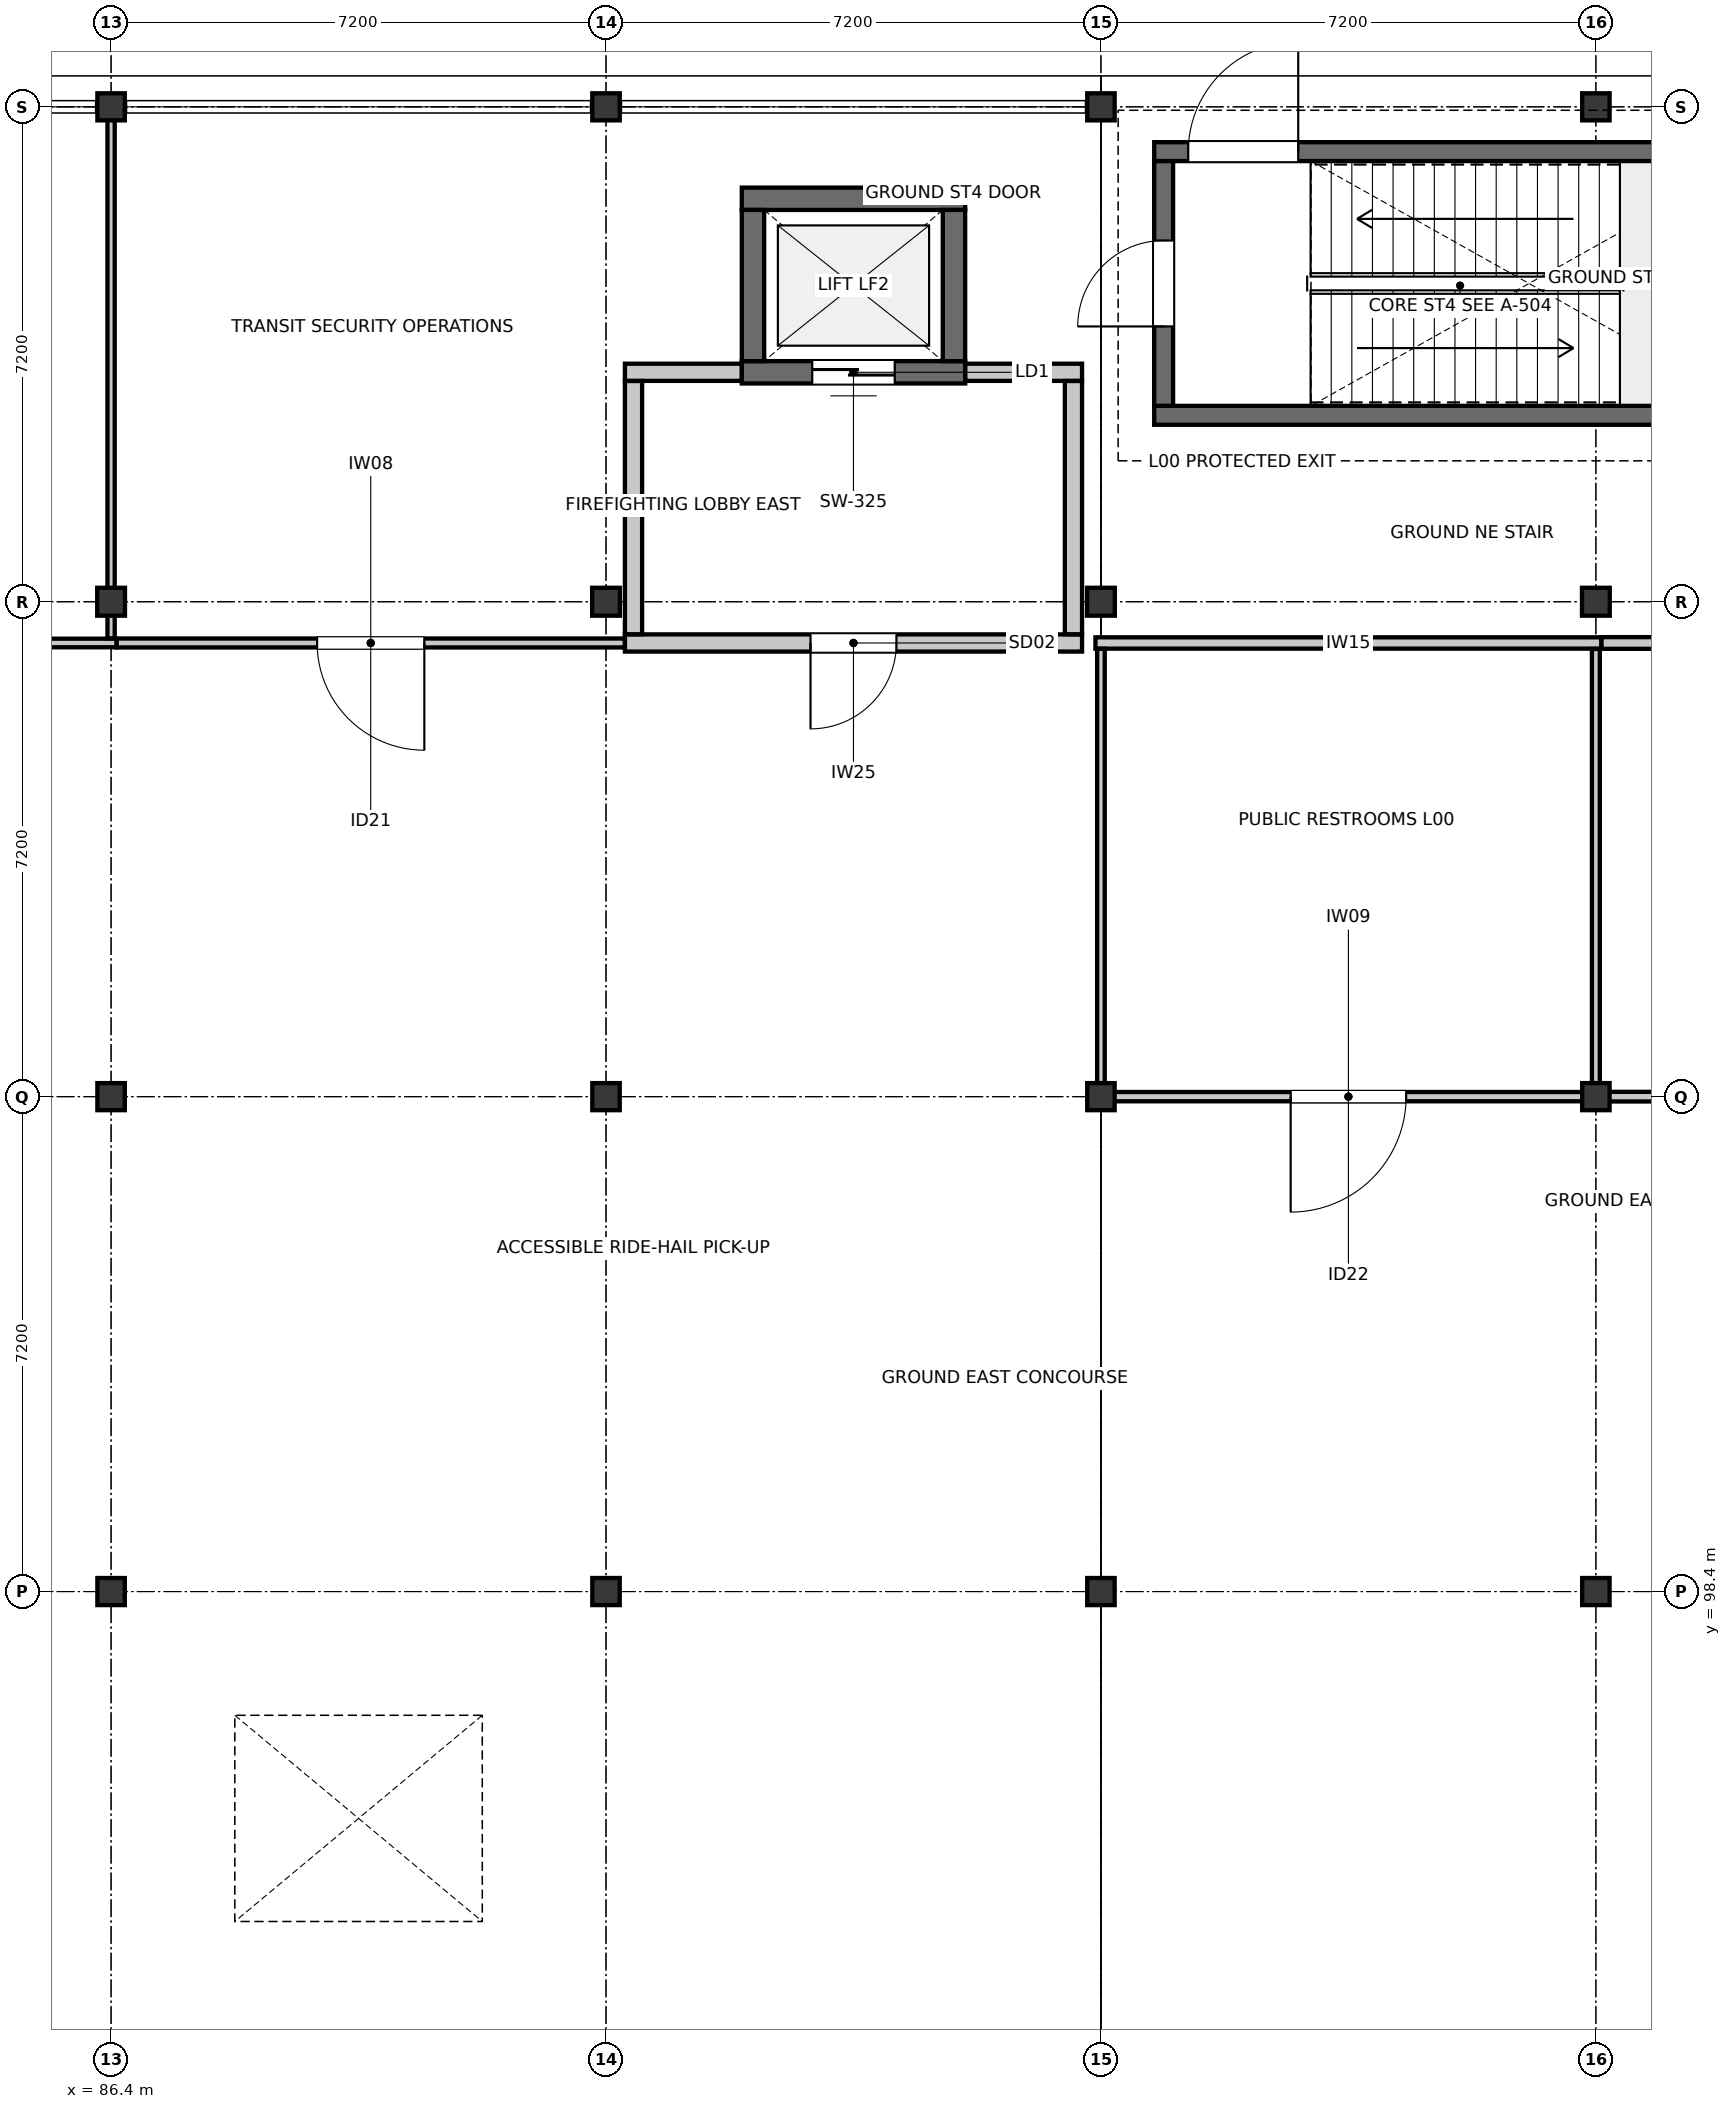
"""IFC4 building model, lengths in metres.
Left out: names, types, materials, properties, quantities, classifications, styles, units other than length and angle.
Written with IfcOpenShell. Run it as: python <this file> out.ifc"""

import sys

from ifc_helpers import new_model, si_unit, direction, frame, frame_2d, origin, origin_2d, place, context, subcontext, project, spatial, rectangle, i_section, extrude, element, fill, save


model = new_model("IFC4")
c1 = context("Model", 3, precision=1e-05, world=origin(), true_north=direction((0.0, 1.0)))
c2 = subcontext(c1, "Body", "Model", "MODEL_VIEW")
j1 = project(units=[si_unit("LENGTHUNIT", "METRE"), si_unit("PLANEANGLEUNIT", "RADIAN")], contexts=[c1])
p1 = place(None, origin())
s1 = spatial("IfcSite", under=j1, at=p1, CompositionType="ELEMENT")
p2 = place(p1, origin())
s2 = spatial("IfcBuilding", under=s1, at=p2, CompositionType="ELEMENT")
p3 = place(p2, origin())
s3 = spatial("IfcBuildingStorey", under=s2, at=p3, CompositionType="ELEMENT", Elevation=0.0)
for number, where, z_axis, x_axis in (
    (1, (86.4, 98.4, 0.0), (0.0, 0.0, 1.0), (1.0, 0.0, 0.0)),
    (2, (86.4, 105.6, 0.0), (0.0, 0.0, 1.0), (1.0, 0.0, 0.0)),
):
    element("IfcColumn", number, at=place(p3, frame(where, z_axis=z_axis, x_axis=x_axis)), inside=s3, PredefinedType="COLUMN", context=c2, shape_type="SweptSolid", body=[
        extrude(i_section(OverallWidth=0.399, OverallDepth=0.394, WebThickness=0.023, FlangeThickness=0.037, FilletRadius=0.015, at=origin_2d()), origin(), (0.0, 0.0, 1.0), 5.4),
    ])
p4 = place(p3, frame((86.4, 112.8, 0.0), z_axis=(0.0, 0.0, 1.0), x_axis=(1.0, 0.0, 0.0)))
e3 = element("IfcColumn", 3, at=p4, inside=s3, PredefinedType="COLUMN", context=c2, shape_type="SweptSolid", body=[
    extrude(i_section(OverallWidth=0.404, OverallDepth=0.406, WebThickness=0.027, FlangeThickness=0.044, FilletRadius=0.015, at=origin_2d()), origin(), (0.0, 0.0, 1.0), 5.4),
])
for number, where, z_axis, x_axis in (
    (4, (86.4, 120.0, 0.0), (0.0, 0.0, 1.0), (1.0, 0.0, 0.0)),
    (5, (93.6, 98.4, 0.0), (0.0, 0.0, 1.0), (1.0, 0.0, 0.0)),
    (6, (93.6, 105.6, 0.0), (0.0, 0.0, 1.0), (1.0, 0.0, 0.0)),
):
    element("IfcColumn", number, at=place(p3, frame(where, z_axis=z_axis, x_axis=x_axis)), inside=s3, PredefinedType="COLUMN", context=c2, shape_type="SweptSolid", body=[
        extrude(i_section(OverallWidth=0.399, OverallDepth=0.394, WebThickness=0.023, FlangeThickness=0.037, FilletRadius=0.015, at=origin_2d()), origin(), (0.0, 0.0, 1.0), 5.4),
    ])
p5 = place(p3, frame((93.6, 112.8, 0.0), z_axis=(0.0, 0.0, 1.0), x_axis=(1.0, 0.0, 0.0)))
e7 = element("IfcColumn", 7, at=p5, inside=s3, PredefinedType="COLUMN", context=c2, shape_type="SweptSolid", body=[
    extrude(i_section(OverallWidth=0.404, OverallDepth=0.406, WebThickness=0.027, FlangeThickness=0.044, FilletRadius=0.015, at=origin_2d()), origin(), (0.0, 0.0, 1.0), 5.4),
])
for number, where, z_axis, x_axis in (
    (8, (93.6, 120.0, 0.0), (0.0, 0.0, 1.0), (1.0, 0.0, 0.0)),
    (9, (100.8, 98.4, 0.0), (0.0, 0.0, 1.0), (1.0, 0.0, 0.0)),
    (10, (100.8, 105.6, 0.0), (0.0, 0.0, 1.0), (1.0, 0.0, 0.0)),
):
    element("IfcColumn", number, at=place(p3, frame(where, z_axis=z_axis, x_axis=x_axis)), inside=s3, PredefinedType="COLUMN", context=c2, shape_type="SweptSolid", body=[
        extrude(i_section(OverallWidth=0.399, OverallDepth=0.394, WebThickness=0.023, FlangeThickness=0.037, FilletRadius=0.015, at=origin_2d()), origin(), (0.0, 0.0, 1.0), 5.4),
    ])
p6 = place(p3, frame((100.8, 112.8, 0.0), z_axis=(0.0, 0.0, 1.0), x_axis=(1.0, 0.0, 0.0)))
e11 = element("IfcColumn", 11, at=p6, inside=s3, PredefinedType="COLUMN", context=c2, shape_type="SweptSolid", body=[
    extrude(i_section(OverallWidth=0.404, OverallDepth=0.406, WebThickness=0.027, FlangeThickness=0.044, FilletRadius=0.015, at=origin_2d()), origin(), (0.0, 0.0, 1.0), 5.4),
])
for number, where, z_axis, x_axis in (
    (12, (100.8, 120.0, 0.0), (0.0, 0.0, 1.0), (1.0, 0.0, 0.0)),
    (13, (108.0, 98.4, 0.0), (0.0, 0.0, 1.0), (1.0, 0.0, 0.0)),
    (14, (108.0, 105.6, 0.0), (0.0, 0.0, 1.0), (1.0, 0.0, 0.0)),
):
    element("IfcColumn", number, at=place(p3, frame(where, z_axis=z_axis, x_axis=x_axis)), inside=s3, PredefinedType="COLUMN", context=c2, shape_type="SweptSolid", body=[
        extrude(i_section(OverallWidth=0.399, OverallDepth=0.394, WebThickness=0.023, FlangeThickness=0.037, FilletRadius=0.015, at=origin_2d()), origin(), (0.0, 0.0, 1.0), 5.4),
    ])
p7 = place(p3, frame((108.0, 112.8, 0.0), z_axis=(0.0, 0.0, 1.0), x_axis=(1.0, 0.0, 0.0)))
e15 = element("IfcColumn", 15, at=p7, inside=s3, PredefinedType="COLUMN", context=c2, shape_type="SweptSolid", body=[
    extrude(i_section(OverallWidth=0.404, OverallDepth=0.406, WebThickness=0.027, FlangeThickness=0.044, FilletRadius=0.015, at=origin_2d()), origin(), (0.0, 0.0, 1.0), 5.4),
])
p8 = place(p3, frame((108.0, 120.0, 0.0), z_axis=(0.0, 0.0, 1.0), x_axis=(1.0, 0.0, 0.0)))
e16 = element("IfcColumn", 16, at=p8, inside=s3, PredefinedType="COLUMN", context=c2, shape_type="SweptSolid", body=[
    extrude(i_section(OverallWidth=0.399, OverallDepth=0.394, WebThickness=0.023, FlangeThickness=0.037, FilletRadius=0.015, at=origin_2d()), origin(), (0.0, 0.0, 1.0), 5.4),
])
p9 = place(p3, frame((110.475, 115.512, 0.0), z_axis=(0.0, 0.0, 1.0), x_axis=(-1.0, 0.0, 0.0)))
e17 = element("IfcWall", 17, at=p9, inside=s3, PredefinedType="SOLIDWALL", context=c2, shape_type="SweptSolid", body=[
    extrude(rectangle(XDim=8.9, YDim=0.275, at=frame_2d((4.45, 0.0))), origin(), (0.0, 0.0, 1.0), 5.16),
])
p10 = place(p3, frame((101.575, 119.348, 0.0), z_axis=(0.0, 0.0, 1.0), x_axis=(1.0, 0.0, 0.0)))
e18 = element("IfcWall", 18, at=p10, inside=s3, PredefinedType="SOLIDWALL", context=c2, shape_type="SweptSolid", body=[
    extrude(rectangle(XDim=8.9, YDim=0.275, at=frame_2d((4.45, 0.0))), origin(), (0.0, 0.0, 1.0), 5.16),
])
p11 = place(p10, frame((0.495, 0.0, 0.0)))
e19 = element("IfcOpeningElement", 19, at=p11, cuts=e18, PredefinedType="OPENING", context=c2, shape_type="SweptSolid", body=[
    extrude(rectangle(XDim=1.6, YDim=2.15, at=frame_2d((0.8, 1.075))), frame((0.0, 0.147, 0.0), z_axis=(0.0, -1.0, 0.0), x_axis=(1.0, 0.0, 0.0)), (0.0, 0.0, 1.0), 0.295),
])
p12 = place(p3, frame((101.712, 115.65, 0.0), z_axis=(0.0, 0.0, 1.0), x_axis=(0.0, 1.0, 0.0)))
e20 = element("IfcWall", 20, at=p12, inside=s3, PredefinedType="SOLIDWALL", context=c2, shape_type="SweptSolid", body=[
    extrude(rectangle(XDim=3.56, YDim=0.275, at=frame_2d((1.78, 0.0))), origin(), (0.0, 0.0, 1.0), 5.16),
])
p13 = place(p12, frame((1.155, 0.0, 0.0)))
e21 = element("IfcOpeningElement", 21, at=p13, cuts=e20, PredefinedType="OPENING", context=c2, shape_type="SweptSolid", body=[
    extrude(rectangle(XDim=1.25, YDim=2.2, at=frame_2d((0.625, 1.1))), frame((0.0, 0.147, 0.0), z_axis=(0.0, -1.0, 0.0), x_axis=(1.0, 0.0, 0.0)), (0.0, 0.0, 1.0), 0.295),
])
p14 = place(p3, frame((98.825, 116.138, 0.0), z_axis=(0.0, 0.0, 1.0), x_axis=(-1.0, 0.0, 0.0)))
e22 = element("IfcWall", 22, at=p14, inside=s3, PredefinedType="SHEAR", context=c2, shape_type="SweptSolid", body=[
    extrude(rectangle(XDim=3.25, YDim=0.325, at=frame_2d((1.625, 0.0))), origin(), (0.0, 0.0, 1.0), 5.16),
])
p15 = place(p14, frame((1.025, 0.0, 0.0)))
e23 = element("IfcOpeningElement", 23, at=p15, cuts=e22, PredefinedType="OPENING", context=c2, shape_type="SweptSolid", body=[
    extrude(rectangle(XDim=1.2, YDim=2.2, at=frame_2d((0.6, 1.1))), frame((0.0, 0.172, 0.0), z_axis=(0.0, -1.0, 0.0), x_axis=(1.0, 0.0, 0.0)), (0.0, 0.0, 1.0), 0.345),
])
p16 = place(p3, frame((95.575, 118.662, 0.0), z_axis=(0.0, 0.0, 1.0), x_axis=(1.0, 0.0, 0.0)))
e24 = element("IfcWall", 24, at=p16, inside=s3, PredefinedType="SHEAR", context=c2, shape_type="SweptSolid", body=[
    extrude(rectangle(XDim=3.25, YDim=0.325, at=frame_2d((1.625, 0.0))), origin(), (0.0, 0.0, 1.0), 5.16),
])
for number, where, z_axis, x_axis in (
    (25, (95.738, 116.3, 0.0), (0.0, 0.0, 1.0), (0.0, 1.0, 0.0)),
    (26, (98.662, 118.5, 0.0), (0.0, 0.0, 1.0), (0.0, -1.0, 0.0)),
):
    element("IfcWall", number, at=place(p3, frame(where, z_axis=z_axis, x_axis=x_axis)), inside=s3, PredefinedType="SHEAR", context=c2, shape_type="SweptSolid", body=[
        extrude(rectangle(XDim=2.2, YDim=0.325, at=frame_2d((1.1, 0.0))), origin(), (0.0, 0.0, 1.0), 5.16),
    ])
p17 = place(p3, frame((100.525, 112.2, 0.0), z_axis=(0.0, 0.0, 1.0), x_axis=(-1.0, 0.0, 0.0)))
e27 = element("IfcWall", 27, at=p17, inside=s3, PredefinedType="PARTITIONING", context=c2, shape_type="SweptSolid", body=[
    extrude(rectangle(XDim=6.65, YDim=0.25, at=frame_2d((3.325, 0.0))), origin(), (0.0, 0.0, 1.0), 4.457),
])
p18 = place(p17, frame((2.7, 0.0, 0.0)))
e28 = element("IfcOpeningElement", 28, at=p18, cuts=e27, PredefinedType="OPENING", context=c2, shape_type="SweptSolid", body=[
    extrude(rectangle(XDim=1.25, YDim=2.2, at=frame_2d((0.625, 1.1))), frame((0.0, 0.135, 0.0), z_axis=(0.0, -1.0, 0.0), x_axis=(1.0, 0.0, 0.0)), (0.0, 0.0, 1.0), 0.27),
])
for number, where, z_axis, x_axis in (
    (29, (93.875, 116.138, 0.0), (0.0, 0.0, 1.0), (1.0, 0.0, 0.0)),
    (30, (98.827, 116.138, 0.0), (0.0, 0.0, 1.0), (1.0, 0.0, 0.0)),
):
    element("IfcWall", number, at=place(p3, frame(where, z_axis=z_axis, x_axis=x_axis)), inside=s3, PredefinedType="PARTITIONING", context=c2, shape_type="SweptSolid", body=[
        extrude(rectangle(XDim=1.698, YDim=0.25, at=frame_2d((0.849, 0.0))), origin(), (0.0, 0.0, 1.0), 4.457),
    ])
for number, where, z_axis, x_axis in (
    (31, (94.0, 112.327, 0.0), (0.0, 0.0, 1.0), (0.0, 1.0, 0.0)),
    (32, (100.4, 116.011, 0.0), (0.0, 0.0, 1.0), (0.0, -1.0, 0.0)),
):
    element("IfcWall", number, at=place(p3, frame(where, z_axis=z_axis, x_axis=x_axis)), inside=s3, PredefinedType="PARTITIONING", context=c2, shape_type="SweptSolid", body=[
        extrude(rectangle(XDim=3.684, YDim=0.25, at=frame_2d((1.842, 0.0))), origin(), (0.0, 0.0, 1.0), 4.457),
    ])
p19 = place(p3, frame((86.48, 112.2, 0.0), z_axis=(0.0, 0.0, 1.0), x_axis=(-1.0, 0.0, 0.0)))
e33 = element("IfcWall", 33, at=p19, inside=s3, PredefinedType="PARTITIONING", context=c2, shape_type="SweptSolid", body=[
    extrude(rectangle(XDim=21.953, YDim=0.125, at=frame_2d((10.977, 0.0))), origin(), (0.0, 0.0, 1.0), 4.457),
])
p20 = place(p19, frame((10.256, 0.0, 0.0)))
e34 = element("IfcOpeningElement", 34, at=p20, cuts=e33, PredefinedType="OPENING", context=c2, shape_type="SweptSolid", body=[
    extrude(rectangle(XDim=1.44, YDim=2.16, at=frame_2d((0.72, 1.08))), frame((0.0, 0.073, 0.0), z_axis=(0.0, -1.0, 0.0), x_axis=(1.0, 0.0, 0.0)), (0.0, 0.0, 1.0), 0.145),
])
p21 = place(p19, frame((15.196, 0.0, 0.95)))
e35 = element("IfcOpeningElement", 35, at=p21, cuts=e33, PredefinedType="OPENING", context=c2, shape_type="SweptSolid", body=[
    extrude(rectangle(XDim=1.75, YDim=1.15, at=frame_2d((0.875, 0.575))), frame((0.0, 0.073, 0.0), z_axis=(0.0, -1.0, 0.0), x_axis=(1.0, 0.0, 0.0)), (0.0, 0.0, 1.0), 0.145),
])
p22 = place(p3, frame((93.873, 112.2, 0.0), z_axis=(0.0, 0.0, 1.0), x_axis=(-1.0, 0.0, 0.0)))
e36 = element("IfcWall", 36, at=p22, inside=s3, PredefinedType="PARTITIONING", context=c2, shape_type="SweptSolid", body=[
    extrude(rectangle(XDim=7.391, YDim=0.13, at=frame_2d((3.696, 0.0))), origin(), (0.0, 0.0, 1.0), 4.457),
])
p23 = place(p22, frame((2.916, 0.0, 0.0)))
e37 = element("IfcOpeningElement", 37, at=p23, cuts=e36, PredefinedType="OPENING", context=c2, shape_type="SweptSolid", body=[
    extrude(rectangle(XDim=1.56, YDim=2.16, at=frame_2d((0.78, 1.08))), frame((0.0, 0.075, 0.0), z_axis=(0.0, -1.0, 0.0), x_axis=(1.0, 0.0, 0.0)), (0.0, 0.0, 1.0), 0.15),
])
p24 = place(p3, frame((108.08, 105.6, 0.0), z_axis=(0.0, 0.0, 1.0), x_axis=(-1.0, 0.0, 0.0)))
e38 = element("IfcWall", 38, at=p24, inside=s3, PredefinedType="PARTITIONING", context=c2, shape_type="SweptSolid", body=[
    extrude(rectangle(XDim=7.36, YDim=0.135, at=frame_2d((3.68, 0.0))), origin(), (0.0, 0.0, 1.0), 4.457),
])
p25 = place(p24, frame((2.84, 0.0, 0.0)))
e39 = element("IfcOpeningElement", 39, at=p25, cuts=e38, PredefinedType="OPENING", context=c2, shape_type="SweptSolid", body=[
    extrude(rectangle(XDim=1.68, YDim=2.16, at=frame_2d((0.84, 1.08))), frame((0.0, 0.077, 0.0), z_axis=(0.0, -1.0, 0.0), x_axis=(1.0, 0.0, 0.0)), (0.0, 0.0, 1.0), 0.155),
])
p26 = place(p3, frame((115.28, 105.6, 0.0), z_axis=(0.0, 0.0, 1.0), x_axis=(-1.0, 0.0, 0.0)))
e40 = element("IfcWall", 40, at=p26, inside=s3, PredefinedType="PARTITIONING", context=c2, shape_type="SweptSolid", body=[
    extrude(rectangle(XDim=7.198, YDim=0.14, at=frame_2d((3.599, 0.0))), origin(), (0.0, 0.0, 1.0), 4.457),
])
p27 = place(p26, frame((3.149, 0.0, 0.0)))
e41 = element("IfcOpeningElement", 41, at=p27, cuts=e40, PredefinedType="OPENING", context=c2, shape_type="SweptSolid", body=[
    extrude(rectangle(XDim=0.9, YDim=2.22, at=frame_2d((0.45, 1.11))), frame((0.0, 0.08, 0.0), z_axis=(0.0, -1.0, 0.0), x_axis=(1.0, 0.0, 0.0)), (0.0, 0.0, 1.0), 0.16),
])
p28 = place(p3, frame((100.72, 112.2, 0.0), z_axis=(0.0, 0.0, 1.0), x_axis=(1.0, 0.0, 0.0)))
e42 = element("IfcWall", 42, at=p28, inside=s3, PredefinedType="PARTITIONING", context=c2, shape_type="SweptSolid", body=[
    extrude(rectangle(XDim=7.36, YDim=0.165, at=frame_2d((3.68, 0.0))), origin(), (0.0, 0.0, 1.0), 4.457),
])
p29 = place(p3, frame((108.082, 112.2, 0.0), z_axis=(0.0, 0.0, 1.0), x_axis=(1.0, 0.0, 0.0)))
e43 = element("IfcWall", 43, at=p29, inside=s3, PredefinedType="PARTITIONING", context=c2, shape_type="SweptSolid", body=[
    extrude(rectangle(XDim=7.198, YDim=0.17, at=frame_2d((3.599, 0.0))), origin(), (0.0, 0.0, 1.0), 4.457),
])
p30 = place(p3, frame((86.4, 119.858, 0.0), z_axis=(0.0, 0.0, 1.0), x_axis=(0.0, -1.0, 0.0)))
e44 = element("IfcWall", 44, at=p30, inside=s3, PredefinedType="PARTITIONING", context=c2, shape_type="SweptSolid", body=[
    extrude(rectangle(XDim=7.591, YDim=0.105, at=frame_2d((3.795, 0.0))), origin(), (0.0, 0.0, 1.0), 4.457),
])
p31 = place(p3, frame((100.8, 105.67, 0.0), z_axis=(0.0, 0.0, 1.0), x_axis=(0.0, 1.0, 0.0)))
e45 = element("IfcWall", 45, at=p31, inside=s3, PredefinedType="PARTITIONING", context=c2, shape_type="SweptSolid", body=[
    extrude(rectangle(XDim=6.446, YDim=0.11, at=frame_2d((3.223, 0.0))), origin(), (0.0, 0.0, 1.0), 4.457),
])
p32 = place(p3, frame((108.0, 112.113, 0.0), z_axis=(0.0, 0.0, 1.0), x_axis=(0.0, -1.0, 0.0)))
e46 = element("IfcWall", 46, at=p32, inside=s3, PredefinedType="PARTITIONING", context=c2, shape_type="SweptSolid", body=[
    extrude(rectangle(XDim=6.441, YDim=0.115, at=frame_2d((3.22, 0.0))), origin(), (0.0, 0.0, 1.0), 4.457),
])
p33 = place(p11, origin())
e47 = element("IfcDoor", 47, at=p33, inside=s3, OperationType="SINGLE_SWING_RIGHT", PredefinedType="DOOR", context=c2, shape_type="SweptSolid", body=[
    extrude(rectangle(XDim=1.6, YDim=2.15, at=frame_2d((0.8, 1.075))), frame((0.0, 0.025, 0.0), z_axis=(0.0, -1.0, 0.0), x_axis=(1.0, 0.0, 0.0)), (0.0, 0.0, 1.0), 0.05),
])
fill(e19, e47)
p34 = place(p13, origin())
e48 = element("IfcDoor", 48, at=p34, inside=s3, OperationType="SINGLE_SWING_LEFT", PredefinedType="DOOR", context=c2, shape_type="SweptSolid", body=[
    extrude(rectangle(XDim=1.25, YDim=2.2, at=frame_2d((0.625, 1.1))), frame((0.0, 0.025, 0.0), z_axis=(0.0, -1.0, 0.0), x_axis=(1.0, 0.0, 0.0)), (0.0, 0.0, 1.0), 0.05),
])
fill(e21, e48)
p35 = place(p15, origin())
e49 = element("IfcDoor", 49, at=p35, inside=s3, OperationType="DOUBLE_DOOR_SLIDING", PredefinedType="DOOR", context=c2, shape_type="SweptSolid", body=[
    extrude(rectangle(XDim=1.2, YDim=2.2, at=frame_2d((0.6, 1.1))), frame((0.0, 0.025, 0.0), z_axis=(0.0, -1.0, 0.0), x_axis=(1.0, 0.0, 0.0)), (0.0, 0.0, 1.0), 0.05),
])
fill(e23, e49)
p36 = place(p18, origin())
e50 = element("IfcDoor", 50, at=p36, inside=s3, OperationType="SINGLE_SWING_RIGHT", PredefinedType="DOOR", context=c2, shape_type="SweptSolid", body=[
    extrude(rectangle(XDim=1.25, YDim=2.2, at=frame_2d((0.625, 1.1))), frame((0.0, 0.025, 0.0), z_axis=(0.0, -1.0, 0.0), x_axis=(1.0, 0.0, 0.0)), (0.0, 0.0, 1.0), 0.05),
])
fill(e28, e50)
p37 = place(p23, origin())
e51 = element("IfcDoor", 51, at=p37, inside=s3, OperationType="SINGLE_SWING_LEFT", PredefinedType="DOOR", context=c2, shape_type="SweptSolid", body=[
    extrude(rectangle(XDim=1.56, YDim=2.16, at=frame_2d((0.78, 1.08))), frame((0.0, 0.025, 0.0), z_axis=(0.0, -1.0, 0.0), x_axis=(1.0, 0.0, 0.0)), (0.0, 0.0, 1.0), 0.05),
])
fill(e37, e51)
p38 = place(p25, origin())
e52 = element("IfcDoor", 52, at=p38, inside=s3, OperationType="SINGLE_SWING_RIGHT", PredefinedType="DOOR", context=c2, shape_type="SweptSolid", body=[
    extrude(rectangle(XDim=1.68, YDim=2.16, at=frame_2d((0.84, 1.08))), frame((0.0, 0.025, 0.0), z_axis=(0.0, -1.0, 0.0), x_axis=(1.0, 0.0, 0.0)), (0.0, 0.0, 1.0), 0.05),
])
fill(e39, e52)
save(model, sys.argv[1])
